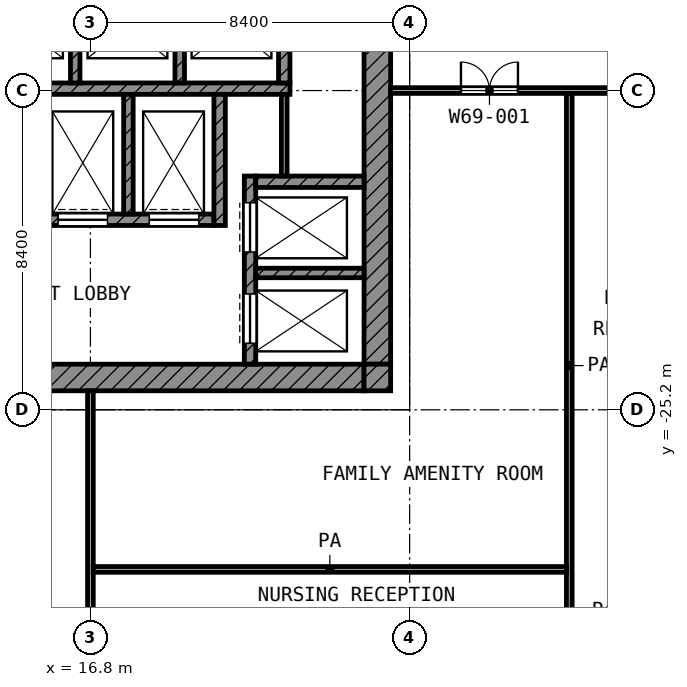
"""IFC4 building model, lengths in metres.
Left out: names, types, materials, properties, quantities, classifications, styles, units other than length and angle.
Written with IfcOpenShell. Run it as: python <this file> out.ifc"""

import sys

from ifc_helpers import new_model, si_unit, direction, frame, frame_2d, origin, place, context, subcontext, project, spatial, rectangle, extrude, element, fill, save


model = new_model("IFC4")
c1 = context("Model", 3, precision=1e-05, world=origin(), true_north=direction((0.0, 1.0)))
c2 = subcontext(c1, "Body", "Model", "MODEL_VIEW")
j1 = project(units=[si_unit("LENGTHUNIT", "METRE"), si_unit("PLANEANGLEUNIT", "RADIAN")], contexts=[c1])
p1 = place(None, origin())
s1 = spatial("IfcSite", under=j1, at=p1, CompositionType="ELEMENT")
p2 = place(p1, origin())
s2 = spatial("IfcBuilding", under=s1, at=p2, CompositionType="ELEMENT")
p3 = place(p2, frame((0.0, 0.0, 298.6)))
s3 = spatial("IfcBuildingStorey", under=s2, at=p3, CompositionType="ELEMENT", Elevation=298.6)
p4 = place(p3, frame((24.35, -24.0, 0.0), z_axis=(0.0, 0.0, 1.0), x_axis=(0.0, 1.0, 0.0)))
e1 = element("IfcWall", 1, at=p4, inside=s3, PredefinedType="SHEAR", context=c2, shape_type="SweptSolid", body=[
    extrude(rectangle(XDim=18.6, YDim=0.7, at=frame_2d((9.3, 0.0))), origin(), (0.0, 0.0, 1.0), 3.6),
])
p5 = place(p4, frame((10.5, 0.0, 0.0)))
e2 = element("IfcOpeningElement", 2, at=p5, cuts=e1, PredefinedType="OPENING", context=c2, shape_type="SweptSolid", body=[
    extrude(rectangle(XDim=1.8, YDim=2.1, at=frame_2d((0.9, 1.05))), frame((0.0, 0.36, 0.0), z_axis=(0.0, -1.0, 0.0), x_axis=(1.0, 0.0, 0.0)), (0.0, 0.0, 1.0), 0.72),
])
p6 = place(p3, frame((5.4, -24.35, 0.0), z_axis=(0.0, 0.0, 1.0), x_axis=(1.0, 0.0, 0.0)))
e3 = element("IfcWall", 3, at=p6, inside=s3, PredefinedType="SHEAR", context=c2, shape_type="SweptSolid", body=[
    extrude(rectangle(XDim=18.6, YDim=0.7, at=frame_2d((9.3, 0.0))), origin(), (0.0, 0.0, 1.0), 3.6),
])
p7 = place(p6, frame((6.3, 0.0, 0.0)))
e4 = element("IfcOpeningElement", 4, at=p7, cuts=e3, PredefinedType="OPENING", context=c2, shape_type="SweptSolid", body=[
    extrude(rectangle(XDim=1.8, YDim=2.1, at=frame_2d((0.9, 1.05))), frame((0.0, 0.36, 0.0), z_axis=(0.0, -1.0, 0.0), x_axis=(1.0, 0.0, 0.0)), (0.0, 0.0, 1.0), 0.72),
])
p8 = place(p3, frame((24.35, -24.7, 0.0), z_axis=(0.0, 0.0, 1.0), x_axis=(0.0, 1.0, 0.0)))
e5 = element("IfcWall", 5, at=p8, inside=s3, PredefinedType="SHEAR", context=c2, shape_type="SweptSolid", body=[
    extrude(rectangle(XDim=0.7, YDim=0.7, at=frame_2d((0.35, 0.0))), origin(), (0.0, 0.0, 1.0), 3.6),
])
p9 = place(p3, frame((5.4, -16.75, 0.0), z_axis=(0.0, 0.0, 1.0), x_axis=(1.0, 0.0, 0.0)))
e6 = element("IfcWall", 6, at=p9, inside=s3, PredefinedType="SHEAR", context=c2, shape_type="SweptSolid", body=[
    extrude(rectangle(XDim=16.65, YDim=0.3, at=frame_2d((8.325, 0.0))), origin(), (0.0, 0.0, 1.0), 3.6),
])
p10 = place(p3, frame((5.4, -20.2, 0.0), z_axis=(0.0, 0.0, 1.0), x_axis=(1.0, 0.0, 0.0)))
e7 = element("IfcWall", 7, at=p10, inside=s3, PredefinedType="SHEAR", context=c2, shape_type="SweptSolid", body=[
    extrude(rectangle(XDim=14.65, YDim=0.3, at=frame_2d((7.325, 0.0))), origin(), (0.0, 0.0, 1.0), 3.6),
])
p11 = place(p10, frame((10.55, 0.0, 0.0)))
e8 = element("IfcOpeningElement", 8, at=p11, cuts=e7, PredefinedType="OPENING", context=c2, shape_type="SweptSolid", body=[
    extrude(rectangle(XDim=1.3, YDim=2.1, at=frame_2d((0.65, 1.05))), frame((0.0, 0.16, 0.0), z_axis=(0.0, -1.0, 0.0), x_axis=(1.0, 0.0, 0.0)), (0.0, 0.0, 1.0), 0.32),
])
p12 = place(p10, frame((12.95, 0.0, 0.0)))
e9 = element("IfcOpeningElement", 9, at=p12, cuts=e7, PredefinedType="OPENING", context=c2, shape_type="SweptSolid", body=[
    extrude(rectangle(XDim=1.3, YDim=2.1, at=frame_2d((0.65, 1.05))), frame((0.0, 0.16, 0.0), z_axis=(0.0, -1.0, 0.0), x_axis=(1.0, 0.0, 0.0)), (0.0, 0.0, 1.0), 0.32),
])
p13 = place(p10, frame((0.55, 0.0, 0.0)))
e10 = element("IfcOpeningElement", 10, at=p13, cuts=e7, PredefinedType="OPENING", context=c2, shape_type="SweptSolid", body=[
    extrude(rectangle(XDim=1.3, YDim=2.1, at=frame_2d((0.65, 1.05))), frame((0.0, 0.16, 0.0), z_axis=(0.0, -1.0, 0.0), x_axis=(1.0, 0.0, 0.0)), (0.0, 0.0, 1.0), 0.32),
])
p14 = place(p10, frame((2.95, 0.0, 0.0)))
e11 = element("IfcOpeningElement", 11, at=p14, cuts=e7, PredefinedType="OPENING", context=c2, shape_type="SweptSolid", body=[
    extrude(rectangle(XDim=1.3, YDim=2.1, at=frame_2d((0.65, 1.05))), frame((0.0, 0.16, 0.0), z_axis=(0.0, -1.0, 0.0), x_axis=(1.0, 0.0, 0.0)), (0.0, 0.0, 1.0), 0.32),
])
p15 = place(p10, frame((5.35, 0.0, 0.0)))
e12 = element("IfcOpeningElement", 12, at=p15, cuts=e7, PredefinedType="OPENING", context=c2, shape_type="SweptSolid", body=[
    extrude(rectangle(XDim=0.9, YDim=2.1, at=frame_2d((0.45, 1.05))), frame((0.0, 0.16, 0.0), z_axis=(0.0, -1.0, 0.0), x_axis=(1.0, 0.0, 0.0)), (0.0, 0.0, 1.0), 0.32),
])
p16 = place(p10, frame((7.75, 0.0, 0.0)))
e13 = element("IfcOpeningElement", 13, at=p16, cuts=e7, PredefinedType="OPENING", context=c2, shape_type="SweptSolid", body=[
    extrude(rectangle(XDim=0.9, YDim=2.1, at=frame_2d((0.45, 1.05))), frame((0.0, 0.16, 0.0), z_axis=(0.0, -1.0, 0.0), x_axis=(1.0, 0.0, 0.0)), (0.0, 0.0, 1.0), 0.32),
])
p17 = place(p3, frame((20.2, -20.35, 0.0), z_axis=(0.0, 0.0, 1.0), x_axis=(0.0, 1.0, 0.0)))
e14 = element("IfcWall", 14, at=p17, inside=s3, PredefinedType="SHEAR", context=c2, shape_type="SweptSolid", body=[
    extrude(rectangle(XDim=3.45, YDim=0.3, at=frame_2d((1.725, 0.0))), origin(), (0.0, 0.0, 1.0), 3.6),
])
p18 = place(p3, frame((21.9, -16.6, 0.0), z_axis=(0.0, 0.0, 1.0), x_axis=(0.0, 1.0, 0.0)))
e15 = element("IfcWall", 15, at=p18, inside=s3, PredefinedType="SHEAR", context=c2, shape_type="SweptSolid", body=[
    extrude(rectangle(XDim=2.35, YDim=0.3, at=frame_2d((1.175, 0.0))), origin(), (0.0, 0.0, 1.0), 3.6),
])
p19 = place(p3, frame((21.15, -19.2, 0.0), z_axis=(0.0, 0.0, 1.0), x_axis=(1.0, 0.0, 0.0)))
e16 = element("IfcWall", 16, at=p19, inside=s3, PredefinedType="SHEAR", context=c2, shape_type="SweptSolid", body=[
    extrude(rectangle(XDim=2.85, YDim=0.3, at=frame_2d((1.425, 0.0))), origin(), (0.0, 0.0, 1.0), 3.6),
])
p20 = place(p3, frame((21.0, -24.0, 0.0), z_axis=(0.0, 0.0, 1.0), x_axis=(0.0, 1.0, 0.0)))
e17 = element("IfcWall", 17, at=p20, inside=s3, PredefinedType="SHEAR", context=c2, shape_type="SweptSolid", body=[
    extrude(rectangle(XDim=4.95, YDim=0.3, at=frame_2d((2.475, 0.0))), origin(), (0.0, 0.0, 1.0), 3.6),
])
p21 = place(p20, frame((2.95, 0.0, 0.0)))
e18 = element("IfcOpeningElement", 18, at=p21, cuts=e17, PredefinedType="OPENING", context=c2, shape_type="SweptSolid", body=[
    extrude(rectangle(XDim=1.3, YDim=2.1, at=frame_2d((0.65, 1.05))), frame((0.0, 0.16, 0.0), z_axis=(0.0, -1.0, 0.0), x_axis=(1.0, 0.0, 0.0)), (0.0, 0.0, 1.0), 0.32),
])
p22 = place(p20, frame((0.55, 0.0, 0.0)))
e19 = element("IfcOpeningElement", 19, at=p22, cuts=e17, PredefinedType="OPENING", context=c2, shape_type="SweptSolid", body=[
    extrude(rectangle(XDim=1.3, YDim=2.1, at=frame_2d((0.65, 1.05))), frame((0.0, 0.16, 0.0), z_axis=(0.0, -1.0, 0.0), x_axis=(1.0, 0.0, 0.0)), (0.0, 0.0, 1.0), 0.32),
])
p23 = place(p3, frame((21.15, -21.6, 0.0), z_axis=(0.0, 0.0, 1.0), x_axis=(1.0, 0.0, 0.0)))
e20 = element("IfcWall", 20, at=p23, inside=s3, PredefinedType="SHEAR", context=c2, shape_type="SweptSolid", body=[
    extrude(rectangle(XDim=2.85, YDim=0.25, at=frame_2d((1.425, 0.0))), origin(), (0.0, 0.0, 1.0), 3.6),
])
p24 = place(p3, frame((17.8, -20.05, 0.0), z_axis=(0.0, 0.0, 1.0), x_axis=(0.0, 1.0, 0.0)))
e21 = element("IfcWall", 21, at=p24, inside=s3, PredefinedType="SHEAR", context=c2, shape_type="SweptSolid", body=[
    extrude(rectangle(XDim=3.15, YDim=0.25, at=frame_2d((1.575, 0.0))), origin(), (0.0, 0.0, 1.0), 3.6),
])
for number, where, z_axis, x_axis in (
    (22, (16.4, -16.6, 0.0), (0.0, 0.0, 1.0), (0.0, 1.0, 0.0)),
    (23, (19.15, -16.6, 0.0), (0.0, 0.0, 1.0), (0.0, 1.0, 0.0)),
):
    element("IfcWall", number, at=place(p3, frame(where, z_axis=z_axis, x_axis=x_axis)), inside=s3, PredefinedType="SHEAR", context=c2, shape_type="SweptSolid", body=[
        extrude(rectangle(XDim=2.35, YDim=0.25, at=frame_2d((1.175, 0.0))), origin(), (0.0, 0.0, 1.0), 3.6),
    ])
p25 = place(p3, frame((21.9, -19.05, 0.0), z_axis=(0.0, 0.0, 1.0), x_axis=(0.0, 1.0, 0.0)))
e24 = element("IfcWall", 24, at=p25, inside=s3, PredefinedType="PARTITIONING", context=c2, shape_type="SweptSolid", body=[
    extrude(rectangle(XDim=2.15, YDim=0.15, at=frame_2d((1.075, 0.0))), origin(), (0.0, 0.0, 1.0), 3.6),
])
p26 = place(p3, frame((16.875, -29.4, 0.0), z_axis=(0.0, 0.0, 1.0), x_axis=(1.0, 0.0, 0.0)))
e25 = element("IfcWall", 25, at=p26, inside=s3, PredefinedType="PARTITIONING", context=c2, shape_type="SweptSolid", body=[
    extrude(rectangle(XDim=12.45, YDim=0.15, at=frame_2d((6.225, 0.0))), origin(), (0.0, 0.0, 1.0), 3.6),
])
p27 = place(p3, frame((24.7, -16.8, 0.0), z_axis=(0.0, 0.0, 1.0), x_axis=(1.0, 0.0, 0.0)))
e26 = element("IfcWall", 26, at=p27, inside=s3, PredefinedType="PARTITIONING", context=c2, shape_type="SweptSolid", body=[
    extrude(rectangle(XDim=34.02, YDim=0.15, at=frame_2d((17.01, 0.0))), origin(), (0.0, 0.0, 1.0), 3.6),
])
p28 = place(p27, frame((1.85, 0.0, 0.0)))
e27 = element("IfcOpeningElement", 27, at=p28, cuts=e26, PredefinedType="OPENING", context=c2, shape_type="SweptSolid", body=[
    extrude(rectangle(XDim=1.5, YDim=2.1, at=frame_2d((0.75, 1.05))), frame((0.0, 0.085, 0.0), z_axis=(0.0, -1.0, 0.0), x_axis=(1.0, 0.0, 0.0)), (0.0, 0.0, 1.0), 0.17),
])
p29 = place(p27, frame((6.2, 0.0, 0.0)))
e28 = element("IfcOpeningElement", 28, at=p29, cuts=e26, PredefinedType="OPENING", context=c2, shape_type="SweptSolid", body=[
    extrude(rectangle(XDim=1.2, YDim=2.1, at=frame_2d((0.6, 1.05))), frame((0.0, 0.085, 0.0), z_axis=(0.0, -1.0, 0.0), x_axis=(1.0, 0.0, 0.0)), (0.0, 0.0, 1.0), 0.17),
])
p30 = place(p27, frame((10.35, 0.0, 0.0)))
e29 = element("IfcOpeningElement", 29, at=p30, cuts=e26, PredefinedType="OPENING", context=c2, shape_type="SweptSolid", body=[
    extrude(rectangle(XDim=1.0, YDim=2.1, at=frame_2d((0.5, 1.05))), frame((0.0, 0.085, 0.0), z_axis=(0.0, -1.0, 0.0), x_axis=(1.0, 0.0, 0.0)), (0.0, 0.0, 1.0), 0.17),
])
p31 = place(p27, frame((20.0, 0.0, 0.0)))
e30 = element("IfcOpeningElement", 30, at=p31, cuts=e26, PredefinedType="OPENING", context=c2, shape_type="SweptSolid", body=[
    extrude(rectangle(XDim=1.2, YDim=2.1, at=frame_2d((0.6, 1.05))), frame((0.0, 0.085, 0.0), z_axis=(0.0, -1.0, 0.0), x_axis=(1.0, 0.0, 0.0)), (0.0, 0.0, 1.0), 0.17),
])
p32 = place(p27, frame((18.4, 0.0, 0.0)))
e31 = element("IfcOpeningElement", 31, at=p32, cuts=e26, PredefinedType="OPENING", context=c2, shape_type="SweptSolid", body=[
    extrude(rectangle(XDim=1.2, YDim=2.1, at=frame_2d((0.6, 1.05))), frame((0.0, 0.085, 0.0), z_axis=(0.0, -1.0, 0.0), x_axis=(1.0, 0.0, 0.0)), (0.0, 0.0, 1.0), 0.17),
])
p33 = place(p27, frame((23.1, 0.0, 0.0)))
e32 = element("IfcOpeningElement", 32, at=p33, cuts=e26, PredefinedType="OPENING", context=c2, shape_type="SweptSolid", body=[
    extrude(rectangle(XDim=1.0, YDim=2.1, at=frame_2d((0.5, 1.05))), frame((0.0, 0.085, 0.0), z_axis=(0.0, -1.0, 0.0), x_axis=(1.0, 0.0, 0.0)), (0.0, 0.0, 1.0), 0.17),
])
p34 = place(p27, frame((29.15, 0.0, 0.0)))
e33 = element("IfcOpeningElement", 33, at=p34, cuts=e26, PredefinedType="OPENING", context=c2, shape_type="SweptSolid", body=[
    extrude(rectangle(XDim=1.5, YDim=2.1, at=frame_2d((0.75, 1.05))), frame((0.0, 0.085, 0.0), z_axis=(0.0, -1.0, 0.0), x_axis=(1.0, 0.0, 0.0)), (0.0, 0.0, 1.0), 0.17),
])
p35 = place(p3, frame((16.8, -41.92, 0.0), z_axis=(0.0, 0.0, 1.0), x_axis=(0.0, 1.0, 0.0)))
e34 = element("IfcWall", 34, at=p35, inside=s3, PredefinedType="PARTITIONING", context=c2, shape_type="SweptSolid", body=[
    extrude(rectangle(XDim=17.22, YDim=0.15, at=frame_2d((8.61, 0.0))), origin(), (0.0, 0.0, 1.0), 3.6),
])
p36 = place(p35, frame((9.82, 0.0, 0.0)))
e35 = element("IfcOpeningElement", 35, at=p36, cuts=e34, PredefinedType="OPENING", context=c2, shape_type="SweptSolid", body=[
    extrude(rectangle(XDim=1.2, YDim=2.1, at=frame_2d((0.6, 1.05))), frame((0.0, 0.085, 0.0), z_axis=(0.0, -1.0, 0.0), x_axis=(1.0, 0.0, 0.0)), (0.0, 0.0, 1.0), 0.17),
])
p37 = place(p35, frame((5.87, 0.0, 0.0)))
e36 = element("IfcOpeningElement", 36, at=p37, cuts=e34, PredefinedType="OPENING", context=c2, shape_type="SweptSolid", body=[
    extrude(rectangle(XDim=1.0, YDim=2.1, at=frame_2d((0.5, 1.05))), frame((0.0, 0.085, 0.0), z_axis=(0.0, -1.0, 0.0), x_axis=(1.0, 0.0, 0.0)), (0.0, 0.0, 1.0), 0.17),
])
p38 = place(p35, frame((1.67, 0.0, 0.0)))
e37 = element("IfcOpeningElement", 37, at=p38, cuts=e34, PredefinedType="OPENING", context=c2, shape_type="SweptSolid", body=[
    extrude(rectangle(XDim=1.0, YDim=2.1, at=frame_2d((0.5, 1.05))), frame((0.0, 0.085, 0.0), z_axis=(0.0, -1.0, 0.0), x_axis=(1.0, 0.0, 0.0)), (0.0, 0.0, 1.0), 0.17),
])
p39 = place(p3, frame((29.4, -31.198, 0.0), z_axis=(0.0, 0.0, 1.0), x_axis=(0.0, 1.0, 0.0)))
e38 = element("IfcWall", 38, at=p39, inside=s3, PredefinedType="PARTITIONING", context=c2, shape_type="SweptSolid", body=[
    extrude(rectangle(XDim=14.323, YDim=0.15, at=frame_2d((7.162, 0.0))), origin(), (0.0, 0.0, 1.0), 3.6),
])
p40 = place(p21, origin())
e39 = element("IfcDoor", 39, at=p40, inside=s3, OperationType="DOUBLE_DOOR_SLIDING", PredefinedType="DOOR", context=c2, shape_type="SweptSolid", body=[
    extrude(rectangle(XDim=1.3, YDim=2.1, at=frame_2d((0.65, 1.05))), frame((0.0, 0.025, 0.0), z_axis=(0.0, -1.0, 0.0), x_axis=(1.0, 0.0, 0.0)), (0.0, 0.0, 1.0), 0.05),
])
fill(e18, e39)
p41 = place(p22, origin())
e40 = element("IfcDoor", 40, at=p41, inside=s3, OperationType="DOUBLE_DOOR_SLIDING", PredefinedType="DOOR", context=c2, shape_type="SweptSolid", body=[
    extrude(rectangle(XDim=1.3, YDim=2.1, at=frame_2d((0.65, 1.05))), frame((0.0, 0.025, 0.0), z_axis=(0.0, -1.0, 0.0), x_axis=(1.0, 0.0, 0.0)), (0.0, 0.0, 1.0), 0.05),
])
fill(e19, e40)
p42 = place(p11, origin())
e41 = element("IfcDoor", 41, at=p42, inside=s3, OperationType="DOUBLE_DOOR_SLIDING", PredefinedType="DOOR", context=c2, shape_type="SweptSolid", body=[
    extrude(rectangle(XDim=1.3, YDim=2.1, at=frame_2d((0.65, 1.05))), frame((0.0, 0.025, 0.0), z_axis=(0.0, -1.0, 0.0), x_axis=(1.0, 0.0, 0.0)), (0.0, 0.0, 1.0), 0.05),
])
fill(e8, e41)
p43 = place(p12, origin())
e42 = element("IfcDoor", 42, at=p43, inside=s3, OperationType="DOUBLE_DOOR_SLIDING", PredefinedType="DOOR", context=c2, shape_type="SweptSolid", body=[
    extrude(rectangle(XDim=1.3, YDim=2.1, at=frame_2d((0.65, 1.05))), frame((0.0, 0.025, 0.0), z_axis=(0.0, -1.0, 0.0), x_axis=(1.0, 0.0, 0.0)), (0.0, 0.0, 1.0), 0.05),
])
fill(e9, e42)
p44 = place(p28, origin())
e43 = element("IfcDoor", 43, at=p44, inside=s3, OperationType="DOUBLE_DOOR_SINGLE_SWING", PredefinedType="DOOR", context=c2, shape_type="SweptSolid", body=[
    extrude(rectangle(XDim=1.5, YDim=2.1, at=frame_2d((0.75, 1.05))), frame((0.0, 0.025, 0.0), z_axis=(0.0, -1.0, 0.0), x_axis=(1.0, 0.0, 0.0)), (0.0, 0.0, 1.0), 0.05),
])
fill(e27, e43)
save(model, sys.argv[1])
